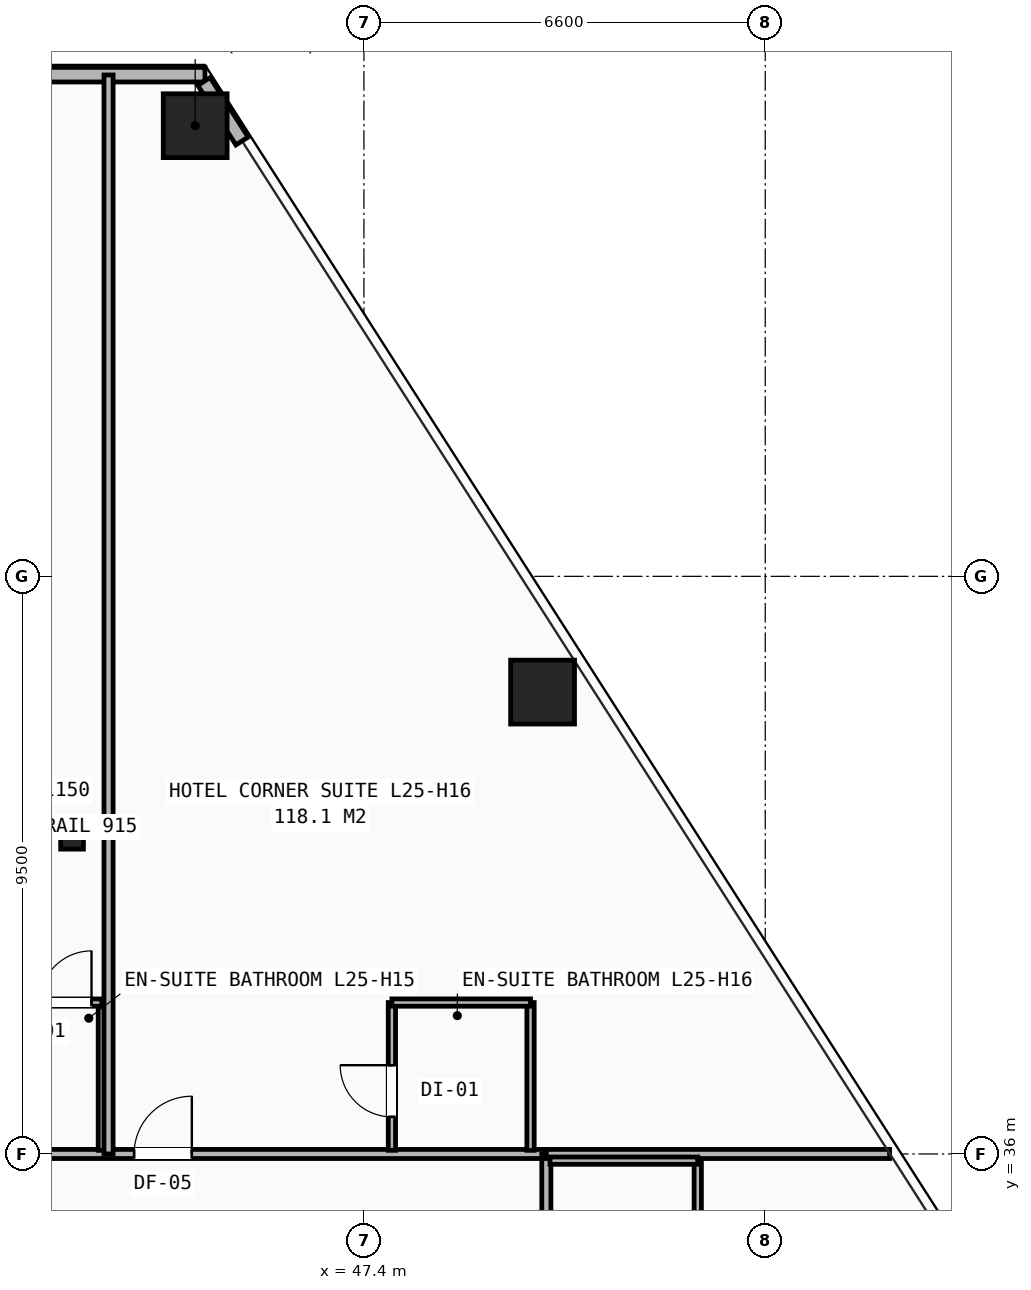
"""IFC4 building model, lengths in metres.
Left out: names, types, materials, properties, quantities, classifications, styles, units other than length and angle.
Written with IfcOpenShell. Run it as: python <this file> out.ifc"""

import sys

from ifc_helpers import new_model, si_unit, direction, frame, frame_2d, origin, origin_2d, place, context, subcontext, project, spatial, rectangle, hollow_rectangle, i_section, extrude, element, fill, save


model = new_model("IFC4")
c1 = context("Model", 3, precision=1e-05, world=origin(), true_north=direction((0.0, 1.0)))
c2 = subcontext(c1, "Body", "Model", "MODEL_VIEW")
j1 = project(units=[si_unit("LENGTHUNIT", "METRE"), si_unit("PLANEANGLEUNIT", "RADIAN")], contexts=[c1])
p1 = place(None, origin())
s1 = spatial("IfcSite", under=j1, at=p1, CompositionType="ELEMENT")
p2 = place(p1, origin())
s2 = spatial("IfcBuilding", under=s1, at=p2, CompositionType="ELEMENT")
p3 = place(p2, frame((0.0, 0.0, 89.4)))
s3 = spatial("IfcBuildingStorey", under=s2, at=p3, CompositionType="ELEMENT", Elevation=89.4)
p4 = place(p3, frame((42.6, 41.2, 0.0), z_axis=(0.0, 0.0, 1.0), x_axis=(1.0, 0.0, 0.0)))
e1 = element("IfcColumn", 1, at=p4, inside=s3, PredefinedType="COLUMN", context=c2, shape_type="SweptSolid", body=[
    extrude(i_section(OverallWidth=0.374, OverallDepth=0.372, WebThickness=0.016, FlangeThickness=0.026, at=origin_2d()), origin(), (0.0, 0.0, 1.0), 3.2),
])
for number, where, z_axis, x_axis in (
    (2, (44.625, 52.912, 0.0), (0.0, 0.0, 1.0), (1.0, 0.0, 0.0)),
    (3, (50.338, 43.596, 0.0), (0.0, 0.0, 1.0), (1.0, 0.0, 0.0)),
):
    element("IfcColumn", number, at=place(p3, frame(where, z_axis=z_axis, x_axis=x_axis)), inside=s3, PredefinedType="COLUMN", context=c2, shape_type="SweptSolid", body=[
        extrude(hollow_rectangle(XDim=1.05, YDim=1.05, WallThickness=0.07, at=origin_2d()), origin(), (0.0, 0.0, 1.0), 3.2),
    ])
p5 = place(p3, frame((35.214, 53.751, 0.0), z_axis=(0.0, 0.0, 1.0), x_axis=(1.0, 0.0, 0.0)))
e4 = element("IfcWall", 4, at=p5, inside=s3, PredefinedType="SHEAR", context=c2, shape_type="SweptSolid", body=[
    extrude(rectangle(XDim=9.571, YDim=0.24, at=frame_2d((4.786, 0.0))), origin(), (0.0, 0.0, 1.0), 2.253),
])
p6 = place(p3, frame((45.396, 52.66, 0.0), z_axis=(0.0, 0.0, 1.0), x_axis=(-0.538898738592, 0.842370553583, 0.0)))
e5 = element("IfcWall", 5, at=p6, inside=s3, PredefinedType="SHEAR", context=c2, shape_type="SweptSolid", body=[
    extrude(rectangle(XDim=1.163, YDim=0.24, at=frame_2d((0.581, 0.0))), origin(), (0.0, 0.0, 1.0), 2.253),
])
p7 = place(p3, frame((40.75, 36.0, 0.0), z_axis=(0.0, 0.0, 1.0), x_axis=(1.0, 0.0, 0.0)))
e6 = element("IfcWall", 6, at=p7, inside=s3, PredefinedType="PARTITIONING", context=c2, shape_type="SweptSolid", body=[
    extrude(rectangle(XDim=9.65, YDim=0.15, at=frame_2d((4.825, 0.0))), origin(), (0.0, 0.0, 1.0), 2.503),
])
p8 = place(p7, frame((2.87, 0.0, 0.0)))
e7 = element("IfcOpeningElement", 7, at=p8, cuts=e6, PredefinedType="OPENING", context=c2, shape_type="SweptSolid", body=[
    extrude(rectangle(XDim=0.95, YDim=2.1, at=frame_2d((0.475, 1.05))), frame((0.0, 0.085, 0.0), z_axis=(0.0, -1.0, 0.0), x_axis=(1.0, 0.0, 0.0)), (0.0, 0.0, 1.0), 0.17),
])
p9 = place(p3, frame((50.4, 14.1, 0.0), z_axis=(0.0, 0.0, 1.0), x_axis=(0.0, 1.0, 0.0)))
e8 = element("IfcWall", 8, at=p9, inside=s3, PredefinedType="PARTITIONING", context=c2, shape_type="SweptSolid", body=[
    extrude(rectangle(XDim=21.9, YDim=0.15, at=frame_2d((10.95, 0.0))), origin(), (0.0, 0.0, 1.0), 2.181),
])
p10 = place(p9, frame((0.42, 0.0, 0.0)))
e9 = element("IfcOpeningElement", 9, at=p10, cuts=e8, PredefinedType="OPENING", context=c2, shape_type="SweptSolid", body=[
    extrude(rectangle(XDim=0.95, YDim=2.1, at=frame_2d((0.475, 1.05))), frame((0.0, 0.085, 0.0), z_axis=(0.0, -1.0, 0.0), x_axis=(1.0, 0.0, 0.0)), (0.0, 0.0, 1.0), 0.17),
])
p11 = place(p9, frame((4.72, 0.0, 0.0)))
e10 = element("IfcOpeningElement", 10, at=p11, cuts=e8, PredefinedType="OPENING", context=c2, shape_type="SweptSolid", body=[
    extrude(rectangle(XDim=0.95, YDim=2.1, at=frame_2d((0.475, 1.05))), frame((0.0, 0.085, 0.0), z_axis=(0.0, -1.0, 0.0), x_axis=(1.0, 0.0, 0.0)), (0.0, 0.0, 1.0), 0.17),
])
p12 = place(p9, frame((9.12, 0.0, 0.0)))
e11 = element("IfcOpeningElement", 11, at=p12, cuts=e8, PredefinedType="OPENING", context=c2, shape_type="SweptSolid", body=[
    extrude(rectangle(XDim=0.95, YDim=2.1, at=frame_2d((0.475, 1.05))), frame((0.0, 0.085, 0.0), z_axis=(0.0, -1.0, 0.0), x_axis=(1.0, 0.0, 0.0)), (0.0, 0.0, 1.0), 0.17),
])
p13 = place(p9, frame((13.72, 0.0, 0.0)))
e12 = element("IfcOpeningElement", 12, at=p13, cuts=e8, PredefinedType="OPENING", context=c2, shape_type="SweptSolid", body=[
    extrude(rectangle(XDim=0.95, YDim=2.1, at=frame_2d((0.475, 1.05))), frame((0.0, 0.085, 0.0), z_axis=(0.0, -1.0, 0.0), x_axis=(1.0, 0.0, 0.0)), (0.0, 0.0, 1.0), 0.17),
])
p14 = place(p9, frame((18.12, 0.0, 0.0)))
e13 = element("IfcOpeningElement", 13, at=p14, cuts=e8, PredefinedType="OPENING", context=c2, shape_type="SweptSolid", body=[
    extrude(rectangle(XDim=0.95, YDim=2.1, at=frame_2d((0.475, 1.05))), frame((0.0, 0.085, 0.0), z_axis=(0.0, -1.0, 0.0), x_axis=(1.0, 0.0, 0.0)), (0.0, 0.0, 1.0), 0.17),
])
p15 = place(p3, frame((50.4, 36.0, 0.0), z_axis=(0.0, 0.0, 1.0), x_axis=(1.0, 0.0, 0.0)))
e14 = element("IfcWall", 14, at=p15, inside=s3, PredefinedType="PARTITIONING", context=c2, shape_type="SweptSolid", body=[
    extrude(rectangle(XDim=5.645, YDim=0.15, at=frame_2d((2.823, 0.0))), origin(), (0.0, 0.0, 1.0), 2.258),
])
p16 = place(p3, frame((52.89, 33.61, 0.0), z_axis=(0.0, 0.0, 1.0), x_axis=(0.0, 1.0, 0.0)))
e15 = element("IfcWall", 15, at=p16, inside=s3, PredefinedType="PARTITIONING", context=c2, shape_type="SweptSolid", body=[
    extrude(rectangle(XDim=2.28, YDim=0.12, at=frame_2d((1.14, 0.0))), origin(), (0.0, 0.0, 1.0), 2.97),
])
for number, where, z_axis, x_axis in (
    (16, (50.46, 35.89, 0.0), (0.0, 0.0, 1.0), (1.0, 0.0, 0.0)),
    (17, (43.09, 36.06, 0.0), (0.0, 0.0, 1.0), (0.0, 1.0, 0.0)),
):
    element("IfcWall", number, at=place(p3, frame(where, z_axis=z_axis, x_axis=x_axis)), inside=s3, PredefinedType="PARTITIONING", context=c2, shape_type="SweptSolid", body=[
        extrude(rectangle(XDim=2.43, YDim=0.12, at=frame_2d((1.215, 0.0))), origin(), (0.0, 0.0, 1.0), 2.97),
    ])
p17 = place(p3, frame((41.95, 38.49, 0.0), z_axis=(0.0, 0.0, 1.0), x_axis=(1.0, 0.0, 0.0)))
e18 = element("IfcWall", 18, at=p17, inside=s3, PredefinedType="PARTITIONING", context=c2, shape_type="SweptSolid", body=[
    extrude(rectangle(XDim=1.14, YDim=0.12, at=frame_2d((0.57, 0.0))), origin(), (0.0, 0.0, 1.0), 2.97),
])
p18 = place(p17, frame((0.12, 0.0, 0.0)))
e19 = element("IfcOpeningElement", 19, at=p18, cuts=e18, PredefinedType="OPENING", context=c2, shape_type="SweptSolid", body=[
    extrude(rectangle(XDim=0.85, YDim=2.05, at=frame_2d((0.425, 1.025))), frame((0.0, 0.07, 0.0), z_axis=(0.0, -1.0, 0.0), x_axis=(1.0, 0.0, 0.0)), (0.0, 0.0, 1.0), 0.14),
])
p19 = place(p3, frame((43.2, 36.0, 0.0), z_axis=(0.0, 0.0, 1.0), x_axis=(0.0, 1.0, 0.0)))
e20 = element("IfcWall", 20, at=p19, inside=s3, PredefinedType="PARTITIONING", context=c2, shape_type="SweptSolid", body=[
    extrude(rectangle(XDim=17.746, YDim=0.15, at=frame_2d((8.873, 0.0))), origin(), (0.0, 0.0, 1.0), 2.181),
])
p20 = place(p3, frame((47.86, 36.06, 0.0), z_axis=(0.0, 0.0, 1.0), x_axis=(0.0, 1.0, 0.0)))
e21 = element("IfcWall", 21, at=p20, inside=s3, PredefinedType="PARTITIONING", context=c2, shape_type="SweptSolid", body=[
    extrude(rectangle(XDim=2.43, YDim=0.12, at=frame_2d((1.215, 0.0))), origin(), (0.0, 0.0, 1.0), 2.503),
])
p21 = place(p20, frame((0.55, 0.0, 0.0)))
e22 = element("IfcOpeningElement", 22, at=p21, cuts=e21, PredefinedType="OPENING", context=c2, shape_type="SweptSolid", body=[
    extrude(rectangle(XDim=0.85, YDim=2.05, at=frame_2d((0.425, 1.025))), frame((0.0, 0.07, 0.0), z_axis=(0.0, -1.0, 0.0), x_axis=(1.0, 0.0, 0.0)), (0.0, 0.0, 1.0), 0.14),
])
p22 = place(p3, frame((50.14, 36.06, 0.0), z_axis=(0.0, 0.0, 1.0), x_axis=(0.0, 1.0, 0.0)))
e23 = element("IfcWall", 23, at=p22, inside=s3, PredefinedType="PARTITIONING", context=c2, shape_type="SweptSolid", body=[
    extrude(rectangle(XDim=2.43, YDim=0.12, at=frame_2d((1.215, 0.0))), origin(), (0.0, 0.0, 1.0), 2.97),
])
p23 = place(p3, frame((47.86, 38.49, 0.0), z_axis=(0.0, 0.0, 1.0), x_axis=(1.0, 0.0, 0.0)))
e24 = element("IfcWall", 24, at=p23, inside=s3, PredefinedType="PARTITIONING", context=c2, shape_type="SweptSolid", body=[
    extrude(rectangle(XDim=2.28, YDim=0.12, at=frame_2d((1.14, 0.0))), origin(), (0.0, 0.0, 1.0), 2.503),
])
p24 = place(p18, origin())
e25 = element("IfcDoor", 25, at=p24, inside=s3, OperationType="SINGLE_SWING_RIGHT", PredefinedType="DOOR", context=c2, shape_type="SweptSolid", body=[
    extrude(rectangle(XDim=0.85, YDim=2.05, at=frame_2d((0.425, 1.025))), frame((0.0, 0.025, 0.0), z_axis=(0.0, -1.0, 0.0), x_axis=(1.0, 0.0, 0.0)), (0.0, 0.0, 1.0), 0.05),
])
fill(e19, e25)
p25 = place(p8, origin())
e26 = element("IfcDoor", 26, at=p25, inside=s3, OperationType="SINGLE_SWING_RIGHT", PredefinedType="DOOR", context=c2, shape_type="SweptSolid", body=[
    extrude(rectangle(XDim=0.95, YDim=2.1, at=frame_2d((0.475, 1.05))), frame((0.0, 0.025, 0.0), z_axis=(0.0, -1.0, 0.0), x_axis=(1.0, 0.0, 0.0)), (0.0, 0.0, 1.0), 0.05),
])
fill(e7, e26)
p26 = place(p21, origin())
e27 = element("IfcDoor", 27, at=p26, inside=s3, OperationType="SINGLE_SWING_RIGHT", PredefinedType="DOOR", context=c2, shape_type="SweptSolid", body=[
    extrude(rectangle(XDim=0.85, YDim=2.05, at=frame_2d((0.425, 1.025))), frame((0.0, 0.025, 0.0), z_axis=(0.0, -1.0, 0.0), x_axis=(1.0, 0.0, 0.0)), (0.0, 0.0, 1.0), 0.05),
])
fill(e22, e27)
save(model, sys.argv[1])
